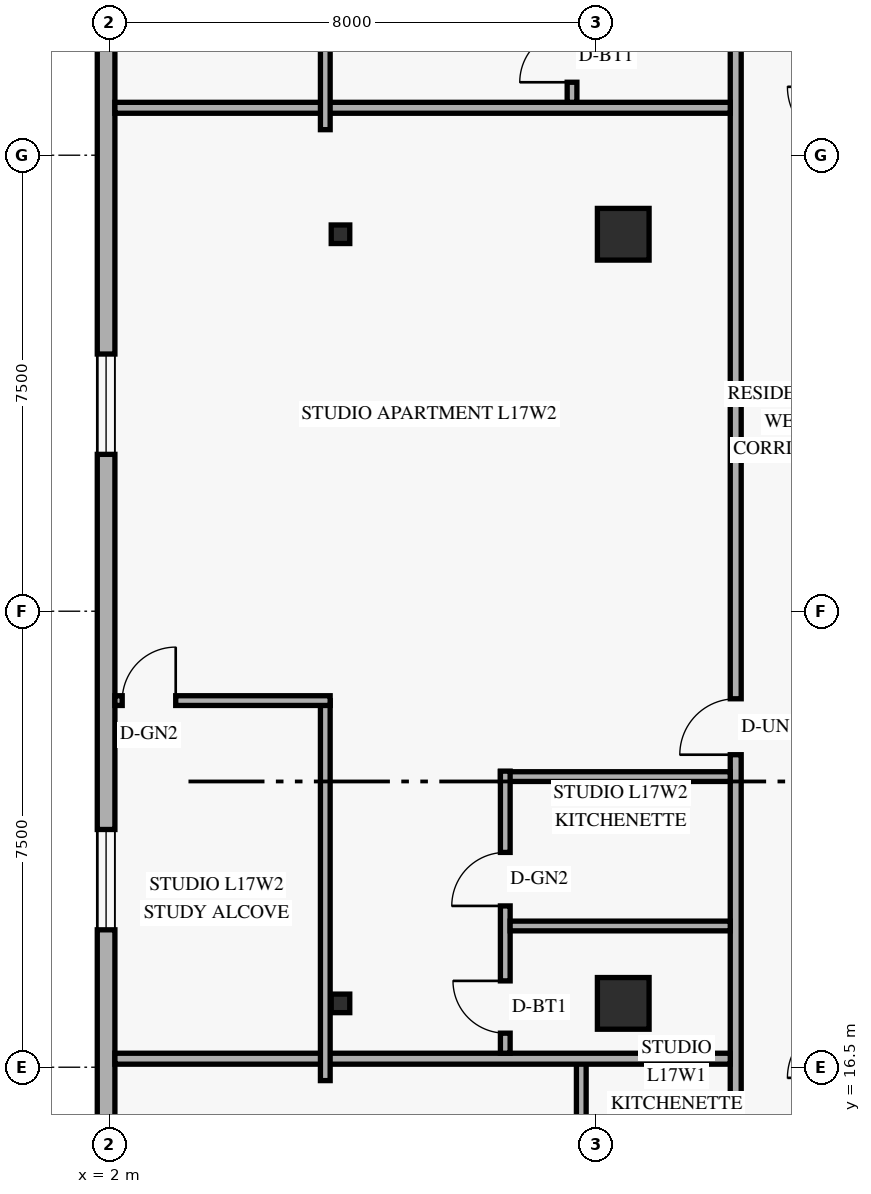
"""IFC4 building model, lengths in metres.
Left out: names, types, materials, properties, quantities, classifications, styles, units other than length and angle.
Written with IfcOpenShell. Run it as: python <this file> out.ifc"""

import sys

from ifc_helpers import new_model, si_unit, direction, frame, frame_2d, origin, origin_2d, place, context, subcontext, project, spatial, rectangle, hollow_rectangle, extrude, element, fill, save


model = new_model("IFC4")
c1 = context("Model", 3, precision=1e-05, world=origin(), true_north=direction((0.0, 1.0)))
c2 = subcontext(c1, "Body", "Model", "MODEL_VIEW")
j1 = project(units=[si_unit("LENGTHUNIT", "METRE"), si_unit("PLANEANGLEUNIT", "RADIAN")], contexts=[c1])
p1 = place(None, origin())
s1 = spatial("IfcSite", under=j1, at=p1, CompositionType="ELEMENT")
p2 = place(p1, origin())
s2 = spatial("IfcBuilding", under=s1, at=p2, CompositionType="ELEMENT")
p3 = place(p2, frame((0.0, 0.0, 67.8)))
s3 = spatial("IfcBuildingStorey", under=s2, at=p3, CompositionType="ELEMENT", Elevation=67.8)
for number, where, z_axis, x_axis in (
    (1, (5.8, 17.55, 0.0), (0.0, 0.0, 1.0), (1.0, 0.0, 0.0)),
    (2, (5.8, 30.2, 0.0), (0.0, 0.0, 1.0), (1.0, 0.0, 0.0)),
):
    element("IfcColumn", number, at=place(p3, frame(where, z_axis=z_axis, x_axis=x_axis)), inside=s3, PredefinedType="COLUMN", context=c2, shape_type="SweptSolid", body=[
        extrude(hollow_rectangle(XDim=0.305, YDim=0.305, WallThickness=0.013, at=origin_2d()), origin(), (0.0, 0.0, 1.0), 3.6),
    ])
for number, where, z_axis, x_axis in (
    (3, (10.45, 17.55, 0.0), (0.0, 0.0, 1.0), (1.0, 0.0, 0.0)),
    (4, (10.45, 30.2, 0.0), (0.0, 0.0, 1.0), (1.0, 0.0, 0.0)),
):
    element("IfcColumn", number, at=place(p3, frame(where, z_axis=z_axis, x_axis=x_axis)), inside=s3, PredefinedType="COLUMN", context=c2, shape_type="SweptSolid", body=[
        extrude(rectangle(XDim=0.85, YDim=0.85, at=origin_2d()), origin(), (0.0, 0.0, 1.0), 3.6),
    ])
p4 = place(p3, frame((1.945, 43.38, 0.0), z_axis=(0.0, 0.0, 1.0), x_axis=(0.0, -1.0, 0.0)))
e5 = element("IfcWall", 5, at=p4, inside=s3, PredefinedType="SOLIDWALL", context=c2, shape_type="SweptSolid", body=[
    extrude(rectangle(XDim=38.76, YDim=0.29, at=frame_2d((19.38, 0.0))), origin(), (0.0, 0.0, 1.0), 3.3),
])
p5 = place(p4, frame((31.925, 0.0, 0.85)))
e6 = element("IfcOpeningElement", 6, at=p5, cuts=e5, PredefinedType="OPENING", context=c2, shape_type="SweptSolid", body=[
    extrude(rectangle(XDim=1.65, YDim=1.6, at=frame_2d((0.825, 0.8))), frame((0.0, 0.155, 0.0), z_axis=(0.0, -1.0, 0.0), x_axis=(1.0, 0.0, 0.0)), (0.0, 0.0, 1.0), 0.31),
])
p6 = place(p4, frame((22.97, 0.0, 0.85)))
e7 = element("IfcOpeningElement", 7, at=p6, cuts=e5, PredefinedType="OPENING", context=c2, shape_type="SweptSolid", body=[
    extrude(rectangle(XDim=1.65, YDim=1.6, at=frame_2d((0.825, 0.8))), frame((0.0, 0.155, 0.0), z_axis=(0.0, -1.0, 0.0), x_axis=(1.0, 0.0, 0.0)), (0.0, 0.0, 1.0), 0.31),
])
p7 = place(p4, frame((15.15, 0.0, 0.85)))
e8 = element("IfcOpeningElement", 8, at=p7, cuts=e5, PredefinedType="OPENING", context=c2, shape_type="SweptSolid", body=[
    extrude(rectangle(XDim=1.65, YDim=1.6, at=frame_2d((0.825, 0.8))), frame((0.0, 0.155, 0.0), z_axis=(0.0, -1.0, 0.0), x_axis=(1.0, 0.0, 0.0)), (0.0, 0.0, 1.0), 0.31),
])
p8 = place(p4, frame((7.33, 0.0, 0.85)))
e9 = element("IfcOpeningElement", 9, at=p8, cuts=e5, PredefinedType="OPENING", context=c2, shape_type="SweptSolid", body=[
    extrude(rectangle(XDim=1.65, YDim=1.6, at=frame_2d((0.825, 0.8))), frame((0.0, 0.155, 0.0), z_axis=(0.0, -1.0, 0.0), x_axis=(1.0, 0.0, 0.0)), (0.0, 0.0, 1.0), 0.31),
])
p9 = place(p4, frame((1.78, 0.0, 0.85)))
e10 = element("IfcOpeningElement", 10, at=p9, cuts=e5, PredefinedType="OPENING", context=c2, shape_type="SweptSolid", body=[
    extrude(rectangle(XDim=1.65, YDim=1.6, at=frame_2d((0.825, 0.8))), frame((0.0, 0.155, 0.0), z_axis=(0.0, -1.0, 0.0), x_axis=(1.0, 0.0, 0.0)), (0.0, 0.0, 1.0), 0.31),
])
p10 = place(p3, frame((12.3, 1.29, 0.0), z_axis=(0.0, 0.0, 1.0), x_axis=(0.0, 1.0, 0.0)))
e11 = element("IfcWall", 11, at=p10, inside=s3, PredefinedType="STANDARD", context=c2, shape_type="SweptSolid", body=[
    extrude(rectangle(XDim=45.42, YDim=0.18, at=frame_2d((22.71, 0.0))), origin(), (0.0, 0.0, 1.0), 2.589),
])
p11 = place(p10, frame((9.41, 0.0, 0.0)))
e12 = element("IfcOpeningElement", 12, at=p11, cuts=e11, PredefinedType="OPENING", context=c2, shape_type="SweptSolid", body=[
    extrude(rectangle(XDim=0.92, YDim=2.15, at=frame_2d((0.46, 1.075))), frame((0.0, 0.1, 0.0), z_axis=(0.0, -1.0, 0.0), x_axis=(1.0, 0.0, 0.0)), (0.0, 0.0, 1.0), 0.2),
])
p12 = place(p10, frame((20.35, 0.0, 0.0)))
e13 = element("IfcOpeningElement", 13, at=p12, cuts=e11, PredefinedType="OPENING", context=c2, shape_type="SweptSolid", body=[
    extrude(rectangle(XDim=0.92, YDim=2.15, at=frame_2d((0.46, 1.075))), frame((0.0, 0.1, 0.0), z_axis=(0.0, -1.0, 0.0), x_axis=(1.0, 0.0, 0.0)), (0.0, 0.0, 1.0), 0.2),
])
p13 = place(p10, frame((35.99, 0.0, 0.0)))
e14 = element("IfcOpeningElement", 14, at=p13, cuts=e11, PredefinedType="OPENING", context=c2, shape_type="SweptSolid", body=[
    extrude(rectangle(XDim=0.92, YDim=2.15, at=frame_2d((0.46, 1.075))), frame((0.0, 0.1, 0.0), z_axis=(0.0, -1.0, 0.0), x_axis=(1.0, 0.0, 0.0)), (0.0, 0.0, 1.0), 0.2),
])
p14 = place(p3, frame((9.76, 11.91, 0.0), z_axis=(0.0, 0.0, 1.0), x_axis=(0.0, 1.0, 0.0)))
e15 = element("IfcWall", 15, at=p14, inside=s3, PredefinedType="PLUMBINGWALL", context=c2, shape_type="SweptSolid", body=[
    extrude(rectangle(XDim=4.73, YDim=0.16, at=frame_2d((2.365, 0.0))), origin(), (0.0, 0.0, 1.0), 2.872),
])
p15 = place(p14, frame((0.42, 0.0, 0.0)))
e16 = element("IfcOpeningElement", 16, at=p15, cuts=e15, PredefinedType="OPENING", context=c2, shape_type="SweptSolid", body=[
    extrude(rectangle(XDim=0.86, YDim=2.12, at=frame_2d((0.43, 1.06))), frame((0.0, 0.09, 0.0), z_axis=(0.0, -1.0, 0.0), x_axis=(1.0, 0.0, 0.0)), (0.0, 0.0, 1.0), 0.18),
])
p16 = place(p14, frame((2.513, 0.0, 0.0)))
e17 = element("IfcOpeningElement", 17, at=p16, cuts=e15, PredefinedType="OPENING", context=c2, shape_type="SweptSolid", body=[
    extrude(rectangle(XDim=0.88, YDim=2.12, at=frame_2d((0.44, 1.06))), frame((0.0, 0.09, 0.0), z_axis=(0.0, -1.0, 0.0), x_axis=(1.0, 0.0, 0.0)), (0.0, 0.0, 1.0), 0.18),
])
p17 = place(p3, frame((2.09, 16.64, 0.0), z_axis=(0.0, 0.0, 1.0), x_axis=(1.0, 0.0, 0.0)))
e18 = element("IfcWall", 18, at=p17, inside=s3, PredefinedType="PARTITIONING", context=c2, shape_type="SweptSolid", body=[
    extrude(rectangle(XDim=10.12, YDim=0.18, at=frame_2d((5.06, 0.0))), origin(), (0.0, 0.0, 1.0), 2.589),
])
p18 = place(p3, frame((8.43, 21.28, 0.0), z_axis=(0.0, 0.0, 1.0), x_axis=(1.0, 0.0, 0.0)))
e19 = element("IfcWall", 19, at=p18, inside=s3, PredefinedType="PLUMBINGWALL", context=c2, shape_type="SweptSolid", body=[
    extrude(rectangle(XDim=3.78, YDim=0.16, at=frame_2d((1.89, 0.0))), origin(), (0.0, 0.0, 1.0), 2.589),
])
p19 = place(p3, frame((8.51, 16.73, 0.0), z_axis=(0.0, 0.0, 1.0), x_axis=(0.0, 1.0, 0.0)))
e20 = element("IfcWall", 20, at=p19, inside=s3, PredefinedType="PLUMBINGWALL", context=c2, shape_type="SweptSolid", body=[
    extrude(rectangle(XDim=4.64, YDim=0.16, at=frame_2d((2.32, 0.0))), origin(), (0.0, 0.0, 1.0), 2.589),
])
p20 = place(p19, frame((0.33, 0.0, 0.0)))
e21 = element("IfcOpeningElement", 21, at=p20, cuts=e20, PredefinedType="OPENING", context=c2, shape_type="SweptSolid", body=[
    extrude(rectangle(XDim=0.86, YDim=2.12, at=frame_2d((0.43, 1.06))), frame((0.0, 0.09, 0.0), z_axis=(0.0, -1.0, 0.0), x_axis=(1.0, 0.0, 0.0)), (0.0, 0.0, 1.0), 0.18),
])
p21 = place(p19, frame((2.423, 0.0, 0.0)))
e22 = element("IfcOpeningElement", 22, at=p21, cuts=e20, PredefinedType="OPENING", context=c2, shape_type="SweptSolid", body=[
    extrude(rectangle(XDim=0.88, YDim=2.12, at=frame_2d((0.44, 1.06))), frame((0.0, 0.09, 0.0), z_axis=(0.0, -1.0, 0.0), x_axis=(1.0, 0.0, 0.0)), (0.0, 0.0, 1.0), 0.18),
])
p22 = place(p3, frame((8.59, 18.823, 0.0), z_axis=(0.0, 0.0, 1.0), x_axis=(1.0, 0.0, 0.0)))
e23 = element("IfcWall", 23, at=p22, inside=s3, PredefinedType="PLUMBINGWALL", context=c2, shape_type="SweptSolid", body=[
    extrude(rectangle(XDim=3.62, YDim=0.16, at=frame_2d((1.81, 0.0))), origin(), (0.0, 0.0, 1.0), 2.589),
])
p23 = place(p3, frame((5.55, 16.28, 0.0), z_axis=(0.0, 0.0, 1.0), x_axis=(0.0, 1.0, 0.0)))
e24 = element("IfcWall", 24, at=p23, inside=s3, PredefinedType="PARTITIONING", context=c2, shape_type="SweptSolid", body=[
    extrude(rectangle(XDim=6.25, YDim=0.16, at=frame_2d((3.125, 0.0))), origin(), (0.0, 0.0, 1.0), 3.3),
])
p24 = place(p3, frame((2.09, 22.53, 0.0), z_axis=(0.0, 0.0, 1.0), x_axis=(1.0, 0.0, 0.0)))
e25 = element("IfcWall", 25, at=p24, inside=s3, PredefinedType="PARTITIONING", context=c2, shape_type="SweptSolid", body=[
    extrude(rectangle(XDim=3.54, YDim=0.16, at=frame_2d((1.77, 0.0))), origin(), (0.0, 0.0, 1.0), 3.3),
])
p25 = place(p24, frame((0.12, 0.0, 0.0)))
e26 = element("IfcOpeningElement", 26, at=p25, cuts=e25, PredefinedType="OPENING", context=c2, shape_type="SweptSolid", body=[
    extrude(rectangle(XDim=0.88, YDim=2.12, at=frame_2d((0.44, 1.06))), frame((0.0, 0.09, 0.0), z_axis=(0.0, -1.0, 0.0), x_axis=(1.0, 0.0, 0.0)), (0.0, 0.0, 1.0), 0.18),
])
p26 = place(p3, frame((2.09, 32.28, 0.0), z_axis=(0.0, 0.0, 1.0), x_axis=(1.0, 0.0, 0.0)))
e27 = element("IfcWall", 27, at=p26, inside=s3, PredefinedType="PARTITIONING", context=c2, shape_type="SweptSolid", body=[
    extrude(rectangle(XDim=10.12, YDim=0.18, at=frame_2d((5.06, 0.0))), origin(), (0.0, 0.0, 1.0), 2.589),
])
p27 = place(p3, frame((9.608, 32.37, 0.0), z_axis=(0.0, 0.0, 1.0), x_axis=(0.0, 1.0, 0.0)))
e28 = element("IfcWall", 28, at=p27, inside=s3, PredefinedType="PLUMBINGWALL", context=c2, shape_type="SweptSolid", body=[
    extrude(rectangle(XDim=4.64, YDim=0.16, at=frame_2d((2.32, 0.0))), origin(), (0.0, 0.0, 1.0), 2.872),
])
p28 = place(p27, frame((0.33, 0.0, 0.0)))
e29 = element("IfcOpeningElement", 29, at=p28, cuts=e28, PredefinedType="OPENING", context=c2, shape_type="SweptSolid", body=[
    extrude(rectangle(XDim=0.86, YDim=2.12, at=frame_2d((0.43, 1.06))), frame((0.0, 0.09, 0.0), z_axis=(0.0, -1.0, 0.0), x_axis=(1.0, 0.0, 0.0)), (0.0, 0.0, 1.0), 0.18),
])
p29 = place(p27, frame((2.423, 0.0, 0.0)))
e30 = element("IfcOpeningElement", 30, at=p29, cuts=e28, PredefinedType="OPENING", context=c2, shape_type="SweptSolid", body=[
    extrude(rectangle(XDim=0.88, YDim=2.12, at=frame_2d((0.44, 1.06))), frame((0.0, 0.09, 0.0), z_axis=(0.0, -1.0, 0.0), x_axis=(1.0, 0.0, 0.0)), (0.0, 0.0, 1.0), 0.18),
])
p30 = place(p3, frame((5.55, 31.92, 0.0), z_axis=(0.0, 0.0, 1.0), x_axis=(0.0, 1.0, 0.0)))
e31 = element("IfcWall", 31, at=p30, inside=s3, PredefinedType="PARTITIONING", context=c2, shape_type="SweptSolid", body=[
    extrude(rectangle(XDim=6.25, YDim=0.16, at=frame_2d((3.125, 0.0))), origin(), (0.0, 0.0, 1.0), 3.3),
])
p31 = place(p6, origin())
e32 = element("IfcWindow", 32, at=p31, inside=s3, PartitioningType="SINGLE_PANEL", PredefinedType="WINDOW", context=c2, shape_type="SweptSolid", body=[
    extrude(rectangle(XDim=1.65, YDim=1.6, at=frame_2d((0.825, 0.8))), frame((0.0, 0.03, 0.0), z_axis=(0.0, -1.0, 0.0), x_axis=(1.0, 0.0, 0.0)), (0.0, 0.0, 1.0), 0.06),
])
fill(e7, e32)
p32 = place(p7, origin())
e33 = element("IfcWindow", 33, at=p32, inside=s3, PartitioningType="SINGLE_PANEL", PredefinedType="WINDOW", context=c2, shape_type="SweptSolid", body=[
    extrude(rectangle(XDim=1.65, YDim=1.6, at=frame_2d((0.825, 0.8))), frame((0.0, 0.03, 0.0), z_axis=(0.0, -1.0, 0.0), x_axis=(1.0, 0.0, 0.0)), (0.0, 0.0, 1.0), 0.06),
])
fill(e8, e33)
p33 = place(p25, origin())
e34 = element("IfcDoor", 34, at=p33, inside=s3, OperationType="SINGLE_SWING_RIGHT", PredefinedType="DOOR", context=c2, shape_type="SweptSolid", body=[
    extrude(rectangle(XDim=0.88, YDim=2.12, at=frame_2d((0.44, 1.06))), frame((0.0, 0.025, 0.0), z_axis=(0.0, -1.0, 0.0), x_axis=(1.0, 0.0, 0.0)), (0.0, 0.0, 1.0), 0.05),
])
fill(e26, e34)
p34 = place(p12, origin())
e35 = element("IfcDoor", 35, at=p34, inside=s3, OperationType="SINGLE_SWING_LEFT", PredefinedType="DOOR", context=c2, shape_type="SweptSolid", body=[
    extrude(rectangle(XDim=0.92, YDim=2.15, at=frame_2d((0.46, 1.075))), frame((0.0, 0.025, 0.0), z_axis=(0.0, -1.0, 0.0), x_axis=(1.0, 0.0, 0.0)), (0.0, 0.0, 1.0), 0.05),
])
fill(e13, e35)
p35 = place(p20, origin())
e36 = element("IfcDoor", 36, at=p35, inside=s3, OperationType="SINGLE_SWING_RIGHT", PredefinedType="DOOR", context=c2, shape_type="SweptSolid", body=[
    extrude(rectangle(XDim=0.86, YDim=2.12, at=frame_2d((0.43, 1.06))), frame((0.0, 0.025, 0.0), z_axis=(0.0, -1.0, 0.0), x_axis=(1.0, 0.0, 0.0)), (0.0, 0.0, 1.0), 0.05),
])
fill(e21, e36)
p36 = place(p21, origin())
e37 = element("IfcDoor", 37, at=p36, inside=s3, OperationType="SINGLE_SWING_LEFT", PredefinedType="DOOR", context=c2, shape_type="SweptSolid", body=[
    extrude(rectangle(XDim=0.88, YDim=2.12, at=frame_2d((0.44, 1.06))), frame((0.0, 0.025, 0.0), z_axis=(0.0, -1.0, 0.0), x_axis=(1.0, 0.0, 0.0)), (0.0, 0.0, 1.0), 0.05),
])
fill(e22, e37)
p37 = place(p28, origin())
e38 = element("IfcDoor", 38, at=p37, inside=s3, OperationType="SINGLE_SWING_LEFT", PredefinedType="DOOR", context=c2, shape_type="SweptSolid", body=[
    extrude(rectangle(XDim=0.86, YDim=2.12, at=frame_2d((0.43, 1.06))), frame((0.0, 0.025, 0.0), z_axis=(0.0, -1.0, 0.0), x_axis=(1.0, 0.0, 0.0)), (0.0, 0.0, 1.0), 0.05),
])
fill(e29, e38)
save(model, sys.argv[1])
